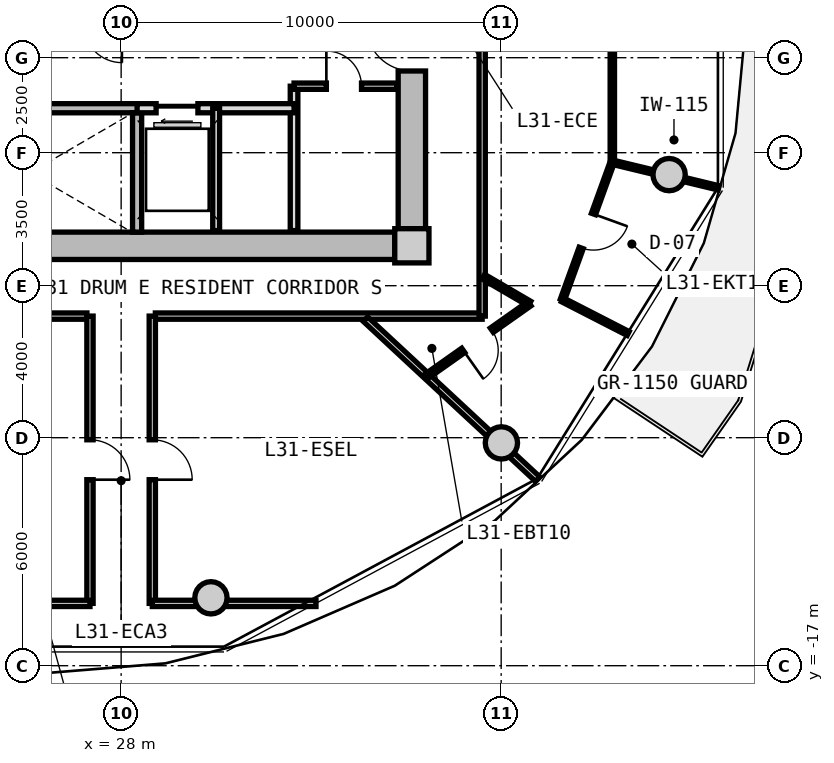
"""IFC4 building model, lengths in metres.
Left out: names, types, materials, properties, quantities, classifications, styles, units other than length and angle.
Written with IfcOpenShell. Run it as: python <this file> out.ifc"""

import sys

from ifc_helpers import new_model, si_unit, direction, frame, frame_2d, origin, origin_2d, place, context, subcontext, project, spatial, rectangle, circle, extrude, source, transform, mapped, element, fill, save


model = new_model("IFC4")
c1 = context("Model", 3, precision=1e-05, world=origin(), true_north=direction((0.0, 1.0)))
c2 = subcontext(c1, "Body", "Model", "MODEL_VIEW")
j1 = project(units=[si_unit("LENGTHUNIT", "METRE"), si_unit("PLANEANGLEUNIT", "RADIAN")], contexts=[c1])
p1 = place(None, origin())
s1 = spatial("IfcSite", under=j1, at=p1, CompositionType="ELEMENT")
p2 = place(p1, origin())
s2 = spatial("IfcBuilding", under=s1, at=p2, CompositionType="ELEMENT")
p3 = place(p2, frame((0.0, 0.0, 102.35)))
s3 = spatial("IfcBuildingStorey", under=s2, at=p3, CompositionType="ELEMENT", Elevation=102.35)
m1 = source(origin(), c2, "Body", "SweptSolid", [
    extrude(rectangle(XDim=0.9, YDim=0.9, at=origin_2d()), origin(), (0.0, 0.0, 1.0), 3.05),
])
p4 = place(p3, frame((35.65, -5.95, 0.0), z_axis=(0.0, 0.0, 1.0), x_axis=(1.0, 0.0, 0.0)))
e1 = element("IfcColumn", 1, at=p4, inside=s3, PredefinedType="COLUMN", context=c2, shape_type="MappedRepresentation", body=[
    mapped(m1, transform((0.0, 0.0, 0.0), x_axis=(1.0, 0.0, 0.0), y_axis=(0.0, 1.0, 0.0), z_axis=(0.0, 0.0, 1.0), scale=1.0)),
])
m2 = source(origin(), c2, "Body", "SweptSolid", [
    extrude(rectangle(XDim=14.4, YDim=0.72, at=frame_2d((7.2, 0.0))), origin(), (0.0, 0.0, 1.0), 2.79),
])
p5 = place(p3, frame((35.2, -5.95, 0.0), z_axis=(0.0, 0.0, 1.0), x_axis=(-1.0, 0.0, 0.0)))
e2 = element("IfcWall", 2, at=p5, inside=s3, PredefinedType="SHEAR", context=c2, shape_type="MappedRepresentation", body=[
    mapped(m2, transform((0.0, 0.0, 0.0), x_axis=(1.0, 0.0, 0.0), y_axis=(0.0, 1.0, 0.0), z_axis=(0.0, 0.0, 1.0), scale=1.0)),
])
m3 = source(origin(), c2, "Body", "SweptSolid", [
    extrude(rectangle(XDim=11.0, YDim=0.72, at=frame_2d((5.5, 0.0))), origin(), (0.0, 0.0, 1.0), 2.79),
])
p6 = place(p3, frame((35.65, 5.5, 0.0), z_axis=(0.0, 0.0, 1.0), x_axis=(0.0, -1.0, 0.0)))
e3 = element("IfcWall", 3, at=p6, inside=s3, PredefinedType="SHEAR", context=c2, shape_type="MappedRepresentation", body=[
    mapped(m3, transform((0.0, 0.0, 0.0), x_axis=(1.0, 0.0, 0.0), y_axis=(0.0, 1.0, 0.0), z_axis=(0.0, 0.0, 1.0), scale=1.0)),
])
p7 = place(p6, frame((5.65, 0.0, 0.0)))
e4 = element("IfcOpeningElement", 4, at=p7, cuts=e3, PredefinedType="OPENING", context=c2, shape_type="SweptSolid", body=[
    extrude(rectangle(XDim=1.2, YDim=2.15, at=frame_2d((0.6, 1.075))), frame((0.0, 0.37, 0.0), z_axis=(0.0, -1.0, 0.0), x_axis=(1.0, 0.0, 0.0)), (0.0, 0.0, 1.0), 0.74),
])
m4 = source(origin(), c2, "Body", "SweptSolid", [
    extrude(circle(Radius=0.425, at=origin_2d()), origin(), (0.0, 0.0, 1.0), 3.05),
])
for number, where, z_axis, x_axis in (
    (5, (30.363, -15.213, 0.0), (0.0, 0.0, 1.0), (1.0, 0.0, 0.0)),
    (6, (38.006, -11.137, 0.0), (0.0, 0.0, 1.0), (1.0, 0.0, 0.0)),
    (7, (42.419, -4.076, 0.0), (0.0, 0.0, 1.0), (1.0, 0.0, 0.0)),
):
    element("IfcColumn", number, at=place(p3, frame(where, z_axis=z_axis, x_axis=x_axis)), inside=s3, PredefinedType="COLUMN", context=c2, shape_type="MappedRepresentation", body=[
        mapped(m4, transform((0.0, 0.0, 0.0), x_axis=(1.0, 0.0, 0.0), y_axis=(0.0, 1.0, 0.0), z_axis=(0.0, 0.0, 1.0), scale=1.0)),
    ])
m5 = source(origin(), c2, "Body", "SweptSolid", [
    extrude(rectangle(XDim=7.83, YDim=0.24, at=frame_2d((3.915, 0.0))), origin(), (0.0, 0.0, 1.0), 2.79),
])
p8 = place(p3, frame((20.71, -2.33, 0.0), z_axis=(0.0, 0.0, 1.0), x_axis=(1.0, 0.0, 0.0)))
e8 = element("IfcWall", 8, at=p8, inside=s3, PredefinedType="PARTITIONING", context=c2, shape_type="MappedRepresentation", body=[
    mapped(m5, transform((0.0, 0.0, 0.0), x_axis=(1.0, 0.0, 0.0), y_axis=(0.0, 1.0, 0.0), z_axis=(0.0, 0.0, 1.0), scale=1.0)),
])
p9 = place(p8, frame((0.95, 0.0, 0.0)))
e9 = element("IfcOpeningElement", 9, at=p9, cuts=e8, PredefinedType="OPENING", context=c2, shape_type="SweptSolid", body=[
    extrude(rectangle(XDim=1.1, YDim=2.15, at=frame_2d((0.55, 1.075))), frame((0.0, 0.13, 0.0), z_axis=(0.0, -1.0, 0.0), x_axis=(1.0, 0.0, 0.0)), (0.0, 0.0, 1.0), 0.26),
])
m6 = source(origin(), c2, "Body", "SweptSolid", [
    extrude(rectangle(XDim=3.14, YDim=0.24, at=frame_2d((1.57, 0.0))), origin(), (0.0, 0.0, 1.0), 2.79),
])
p10 = place(p3, frame((28.42, -5.59, 0.0), z_axis=(0.0, 0.0, 1.0), x_axis=(0.0, 1.0, 0.0)))
e10 = element("IfcWall", 10, at=p10, inside=s3, PredefinedType="PARTITIONING", context=c2, shape_type="MappedRepresentation", body=[
    mapped(m6, transform((0.0, 0.0, 0.0), x_axis=(1.0, 0.0, 0.0), y_axis=(0.0, 1.0, 0.0), z_axis=(0.0, 0.0, 1.0), scale=1.0)),
])
m7 = source(origin(), c2, "Body", "SweptSolid", [
    extrude(rectangle(XDim=3.8, YDim=0.2, at=frame_2d((1.9, 0.0))), origin(), (0.0, 0.0, 1.0), 2.775),
])
p11 = place(p3, frame((32.55, -5.55, 0.0), z_axis=(0.0, 0.0, 1.0), x_axis=(0.0, 1.0, 0.0)))
e11 = element("IfcWall", 11, at=p11, inside=s3, PredefinedType="PARTITIONING", context=c2, shape_type="MappedRepresentation", body=[
    mapped(m7, transform((0.0, 0.0, 0.0), x_axis=(1.0, 0.0, 0.0), y_axis=(0.0, 1.0, 0.0), z_axis=(0.0, 0.0, 1.0), scale=1.0)),
])
m8 = source(origin(), c2, "Body", "SweptSolid", [
    extrude(rectangle(XDim=4.13, YDim=0.24, at=frame_2d((2.065, 0.0))), origin(), (0.0, 0.0, 1.0), 2.775),
])
p12 = place(p3, frame((28.42, -2.33, 0.0), z_axis=(0.0, 0.0, 1.0), x_axis=(1.0, 0.0, 0.0)))
e12 = element("IfcWall", 12, at=p12, inside=s3, PredefinedType="PARTITIONING", context=c2, shape_type="MappedRepresentation", body=[
    mapped(m8, transform((0.0, 0.0, 0.0), x_axis=(1.0, 0.0, 0.0), y_axis=(0.0, 1.0, 0.0), z_axis=(0.0, 0.0, 1.0), scale=1.0)),
])
p13 = place(p12, frame((0.5, 0.0, 0.0)))
e13 = element("IfcOpeningElement", 13, at=p13, cuts=e12, PredefinedType="OPENING", context=c2, shape_type="SweptSolid", body=[
    extrude(rectangle(XDim=1.1, YDim=2.2, at=frame_2d((0.55, 1.1))), frame((0.0, 0.13, 0.0), z_axis=(0.0, -1.0, 0.0), x_axis=(1.0, 0.0, 0.0)), (0.0, 0.0, 1.0), 0.26),
])
m9 = source(origin(), c2, "Body", "SweptSolid", [
    extrude(rectangle(XDim=3.22, YDim=0.18, at=frame_2d((1.61, 0.0))), origin(), (0.0, 0.0, 1.0), 2.775),
])
p14 = place(p3, frame((30.5, -5.55, 0.0), z_axis=(0.0, 0.0, 1.0), x_axis=(0.0, 1.0, 0.0)))
e14 = element("IfcWall", 14, at=p14, inside=s3, PredefinedType="PARTITIONING", context=c2, shape_type="MappedRepresentation", body=[
    mapped(m9, transform((0.0, 0.0, 0.0), x_axis=(1.0, 0.0, 0.0), y_axis=(0.0, 1.0, 0.0), z_axis=(0.0, 0.0, 1.0), scale=1.0)),
])
m10 = source(origin(), c2, "Body", "SweptSolid", [
    extrude(rectangle(XDim=2.7, YDim=0.165, at=frame_2d((1.35, 0.0))), origin(), (0.0, 0.0, 1.0), 2.775),
])
p15 = place(p3, frame((32.55, -1.75, 0.0), z_axis=(0.0, 0.0, 1.0), x_axis=(1.0, 0.0, 0.0)))
e15 = element("IfcWall", 15, at=p15, inside=s3, PredefinedType="PARTITIONING", context=c2, shape_type="MappedRepresentation", body=[
    mapped(m10, transform((0.0, 0.0, 0.0), x_axis=(1.0, 0.0, 0.0), y_axis=(0.0, 1.0, 0.0), z_axis=(0.0, 0.0, 1.0), scale=1.0)),
])
p16 = place(p15, frame((0.85, 0.0, 0.0)))
e16 = element("IfcOpeningElement", 16, at=p16, cuts=e15, PredefinedType="OPENING", context=c2, shape_type="SweptSolid", body=[
    extrude(rectangle(XDim=0.925, YDim=2.1, at=frame_2d((0.462, 1.05))), frame((0.0, 0.093, 0.0), z_axis=(0.0, -1.0, 0.0), x_axis=(1.0, 0.0, 0.0)), (0.0, 0.0, 1.0), 0.185),
])
m11 = source(origin(), c2, "Body", "SweptSolid", [
    extrude(rectangle(XDim=8.6, YDim=0.165, at=frame_2d((4.3, 0.0))), origin(), (0.0, 0.0, 1.0), 2.775),
])
p17 = place(p3, frame((37.5, -7.8, 0.0), z_axis=(0.0, 0.0, 1.0), x_axis=(-1.0, 0.0, 0.0)))
e17 = element("IfcWall", 17, at=p17, inside=s3, PredefinedType="PARTITIONING", context=c2, shape_type="MappedRepresentation", body=[
    mapped(m11, transform((0.0, 0.0, 0.0), x_axis=(1.0, 0.0, 0.0), y_axis=(0.0, 1.0, 0.0), z_axis=(0.0, 0.0, 1.0), scale=1.0)),
])
p18 = place(p3, frame((27.1, -7.8, 0.0), z_axis=(0.0, 0.0, 1.0), x_axis=(-1.0, 0.0, 0.0)))
e18 = element("IfcWall", 18, at=p18, inside=s3, PredefinedType="PARTITIONING", context=c2, shape_type="MappedRepresentation", body=[
    mapped(m11, transform((0.0, 0.0, 0.0), x_axis=(1.0, 0.0, 0.0), y_axis=(0.0, 1.0, 0.0), z_axis=(0.0, 0.0, 1.0), scale=1.0)),
])
p19 = place(p18, frame((4.384, 0.0, 0.0)))
e19 = element("IfcOpeningElement", 19, at=p19, cuts=e18, PredefinedType="OPENING", context=c2, shape_type="SweptSolid", body=[
    extrude(rectangle(XDim=1.05, YDim=2.15, at=frame_2d((0.525, 1.075))), frame((0.0, 0.093, 0.0), z_axis=(0.0, -1.0, 0.0), x_axis=(1.0, 0.0, 0.0)), (0.0, 0.0, 1.0), 0.185),
])
m12 = source(origin(), c2, "Body", "SweptSolid", [
    extrude(rectangle(XDim=15.6, YDim=0.165, at=frame_2d((7.8, 0.0))), origin(), (0.0, 0.0, 1.0), 2.775),
])
p20 = place(p3, frame((37.5, 7.8, 0.0), z_axis=(0.0, 0.0, 1.0), x_axis=(0.0, -1.0, 0.0)))
e20 = element("IfcWall", 20, at=p20, inside=s3, PredefinedType="PARTITIONING", context=c2, shape_type="MappedRepresentation", body=[
    mapped(m12, transform((0.0, 0.0, 0.0), x_axis=(1.0, 0.0, 0.0), y_axis=(0.0, 1.0, 0.0), z_axis=(0.0, 0.0, 1.0), scale=1.0)),
])
p21 = place(p20, frame((6.87, 0.0, 0.0)))
e21 = element("IfcOpeningElement", 21, at=p21, cuts=e20, PredefinedType="OPENING", context=c2, shape_type="SweptSolid", body=[
    extrude(rectangle(XDim=1.05, YDim=2.15, at=frame_2d((0.525, 1.075))), frame((0.0, 0.093, 0.0), z_axis=(0.0, -1.0, 0.0), x_axis=(1.0, 0.0, 0.0)), (0.0, 0.0, 1.0), 0.185),
])
m13 = source(origin(), c2, "Body", "SweptSolid", [
    extrude(rectangle(XDim=6.187, YDim=0.165, at=frame_2d((3.093, 0.0))), origin(), (0.0, 0.0, 1.0), 2.275),
])
p22 = place(p3, frame((34.429, -7.88, 0.0), z_axis=(0.0, 0.0, 1.0), x_axis=(0.732501077882, -0.680765870841, 0.0)))
e22 = element("IfcWall", 22, at=p22, inside=s3, PredefinedType="PARTITIONING", context=c2, shape_type="MappedRepresentation", body=[
    mapped(m13, transform((0.0, 0.0, 0.0), x_axis=(1.0, 0.0, 0.0), y_axis=(0.0, 1.0, 0.0), z_axis=(0.0, 0.0, 1.0), scale=1.0)),
])
m14 = source(origin(), c2, "Body", "SweptSolid", [
    extrude(rectangle(XDim=7.56, YDim=0.165, at=frame_2d((3.78, 0.0))), origin(), (0.0, 0.0, 1.0), 2.775),
])
p23 = place(p3, frame((27.18, -15.36, 0.0), z_axis=(0.0, 0.0, 1.0), x_axis=(0.0, 1.0, 0.0)))
e23 = element("IfcWall", 23, at=p23, inside=s3, PredefinedType="PARTITIONING", context=c2, shape_type="MappedRepresentation", body=[
    mapped(m14, transform((0.0, 0.0, 0.0), x_axis=(1.0, 0.0, 0.0), y_axis=(0.0, 1.0, 0.0), z_axis=(0.0, 0.0, 1.0), scale=1.0)),
])
p24 = place(p23, frame((3.255, 0.0, 0.0)))
e24 = element("IfcOpeningElement", 24, at=p24, cuts=e23, PredefinedType="OPENING", context=c2, shape_type="SweptSolid", body=[
    extrude(rectangle(XDim=1.05, YDim=2.15, at=frame_2d((0.525, 1.075))), frame((0.0, 0.093, 0.0), z_axis=(0.0, -1.0, 0.0), x_axis=(1.0, 0.0, 0.0)), (0.0, 0.0, 1.0), 0.185),
])
m15 = source(origin(), c2, "Body", "SweptSolid", [
    extrude(rectangle(XDim=5.814, YDim=0.165, at=frame_2d((2.907, 0.0))), origin(), (0.0, 0.0, 1.0), 2.275),
])
p25 = place(p3, frame((21.366, -15.36, 0.0), z_axis=(0.0, 0.0, 1.0), x_axis=(1.0, 0.0, 0.0)))
e25 = element("IfcWall", 25, at=p25, inside=s3, PredefinedType="PARTITIONING", context=c2, shape_type="MappedRepresentation", body=[
    mapped(m15, transform((0.0, 0.0, 0.0), x_axis=(1.0, 0.0, 0.0), y_axis=(0.0, 1.0, 0.0), z_axis=(0.0, 0.0, 1.0), scale=1.0)),
])
p26 = place(p3, frame((28.82, -15.36, 0.0), z_axis=(0.0, 0.0, 1.0), x_axis=(0.0, 1.0, 0.0)))
e26 = element("IfcWall", 26, at=p26, inside=s3, PredefinedType="PARTITIONING", context=c2, shape_type="MappedRepresentation", body=[
    mapped(m14, transform((0.0, 0.0, 0.0), x_axis=(1.0, 0.0, 0.0), y_axis=(0.0, 1.0, 0.0), z_axis=(0.0, 0.0, 1.0), scale=1.0)),
])
p27 = place(p26, frame((3.255, 0.0, 0.0)))
e27 = element("IfcOpeningElement", 27, at=p27, cuts=e26, PredefinedType="OPENING", context=c2, shape_type="SweptSolid", body=[
    extrude(rectangle(XDim=1.05, YDim=2.15, at=frame_2d((0.525, 1.075))), frame((0.0, 0.093, 0.0), z_axis=(0.0, -1.0, 0.0), x_axis=(1.0, 0.0, 0.0)), (0.0, 0.0, 1.0), 0.185),
])
m16 = source(origin(), c2, "Body", "SweptSolid", [
    extrude(rectangle(XDim=4.307, YDim=0.165, at=frame_2d((2.153, 0.0))), origin(), (0.0, 0.0, 1.0), 2.275),
])
p28 = place(p3, frame((28.82, -15.36, 0.0), z_axis=(0.0, 0.0, 1.0), x_axis=(1.0, 0.0, 0.0)))
e28 = element("IfcWall", 28, at=p28, inside=s3, PredefinedType="PARTITIONING", context=c2, shape_type="MappedRepresentation", body=[
    mapped(m16, transform((0.0, 0.0, 0.0), x_axis=(1.0, 0.0, 0.0), y_axis=(0.0, 1.0, 0.0), z_axis=(0.0, 0.0, 1.0), scale=1.0)),
])
m17 = source(origin(), c2, "Body", "SweptSolid", [
    extrude(rectangle(XDim=7.499, YDim=0.115, at=frame_2d((3.75, 0.0))), origin(), (0.0, 0.0, 1.0), 2.775),
])
p29 = place(p3, frame((40.925, -3.75, 0.0), z_axis=(0.0, 0.0, 1.0), x_axis=(0.0, 1.0, 0.0)))
e29 = element("IfcWall", 29, at=p29, inside=s3, PredefinedType="PARTITIONING", context=c2, shape_type="MappedRepresentation", body=[
    mapped(m17, transform((0.0, 0.0, 0.0), x_axis=(1.0, 0.0, 0.0), y_axis=(0.0, 1.0, 0.0), z_axis=(0.0, 0.0, 1.0), scale=1.0)),
])
p30 = place(p29, frame((3.275, 0.0, 0.0)))
e30 = element("IfcOpeningElement", 30, at=p30, cuts=e29, PredefinedType="OPENING", context=c2, shape_type="SweptSolid", body=[
    extrude(rectangle(XDim=0.95, YDim=2.1, at=frame_2d((0.475, 1.05))), frame((0.0, 0.067, 0.0), z_axis=(0.0, -1.0, 0.0), x_axis=(1.0, 0.0, 0.0)), (0.0, 0.0, 1.0), 0.135),
])
m18 = source(origin(), c2, "Body", "SweptSolid", [
    extrude(rectangle(XDim=2.879, YDim=0.115, at=frame_2d((1.439, 0.0))), origin(), (0.0, 0.0, 1.0), 2.275),
])
p31 = place(p3, frame((40.925, -3.75, 0.0), z_axis=(0.0, 0.0, 1.0), x_axis=(0.972018140943, -0.234905797454, 0.0)))
e31 = element("IfcWall", 31, at=p31, inside=s3, PredefinedType="PARTITIONING", context=c2, shape_type="MappedRepresentation", body=[
    mapped(m18, transform((0.0, 0.0, 0.0), x_axis=(1.0, 0.0, 0.0), y_axis=(0.0, 1.0, 0.0), z_axis=(0.0, 0.0, 1.0), scale=1.0)),
])
m19 = source(origin(), c2, "Body", "SweptSolid", [
    extrude(rectangle(XDim=1.407, YDim=0.14, at=frame_2d((0.704, 0.0))), origin(), (0.0, 0.0, 1.0), 2.775),
])
p32 = place(p3, frame((37.53, -6.762, 0.0), z_axis=(0.0, 0.0, 1.0), x_axis=(0.863539718977, -0.504280828258, 0.0)))
e32 = element("IfcWall", 32, at=p32, inside=s3, PredefinedType="PARTITIONING", context=c2, shape_type="MappedRepresentation", body=[
    mapped(m19, transform((0.0, 0.0, 0.0), x_axis=(1.0, 0.0, 0.0), y_axis=(0.0, 1.0, 0.0), z_axis=(0.0, 0.0, 1.0), scale=1.0)),
])
m20 = source(origin(), c2, "Body", "SweptSolid", [
    extrude(rectangle(XDim=3.347, YDim=0.14, at=frame_2d((1.673, 0.0))), origin(), (0.0, 0.0, 1.0), 2.775),
])
p33 = place(p3, frame((38.745, -7.472, 0.0), z_axis=(0.0, 0.0, 1.0), x_axis=(-0.81705680263, -0.576557179537, 0.0)))
e33 = element("IfcWall", 33, at=p33, inside=s3, PredefinedType="PARTITIONING", context=c2, shape_type="MappedRepresentation", body=[
    mapped(m20, transform((0.0, 0.0, 0.0), x_axis=(1.0, 0.0, 0.0), y_axis=(0.0, 1.0, 0.0), z_axis=(0.0, 0.0, 1.0), scale=1.0)),
])
p34 = place(p33, frame((1.214, 0.0, 0.0)))
e34 = element("IfcOpeningElement", 34, at=p34, cuts=e33, PredefinedType="OPENING", context=c2, shape_type="SweptSolid", body=[
    extrude(rectangle(XDim=0.92, YDim=2.1, at=frame_2d((0.46, 1.05))), frame((0.0, 0.08, 0.0), z_axis=(0.0, -1.0, 0.0), x_axis=(1.0, 0.0, 0.0)), (0.0, 0.0, 1.0), 0.16),
])
m21 = source(origin(), c2, "Body", "SweptSolid", [
    extrude(rectangle(XDim=1.945, YDim=0.115, at=frame_2d((0.973, 0.0))), origin(), (0.0, 0.0, 1.0), 2.775),
])
p35 = place(p3, frame((39.611, -7.37, 0.0), z_axis=(0.0, 0.0, 1.0), x_axis=(0.889684148329, -0.456576517368, 0.0)))
e35 = element("IfcWall", 35, at=p35, inside=s3, PredefinedType="PARTITIONING", context=c2, shape_type="MappedRepresentation", body=[
    mapped(m21, transform((0.0, 0.0, 0.0), x_axis=(1.0, 0.0, 0.0), y_axis=(0.0, 1.0, 0.0), z_axis=(0.0, 0.0, 1.0), scale=1.0)),
])
m22 = source(origin(), c2, "Body", "SweptSolid", [
    extrude(rectangle(XDim=3.852, YDim=0.115, at=frame_2d((1.926, 0.0))), origin(), (0.0, 0.0, 1.0), 2.775),
])
p36 = place(p3, frame((39.611, -7.37, 0.0), z_axis=(0.0, 0.0, 1.0), x_axis=(0.340653649518, 0.940188859257, 0.0)))
e36 = element("IfcWall", 36, at=p36, inside=s3, PredefinedType="PARTITIONING", context=c2, shape_type="MappedRepresentation", body=[
    mapped(m22, transform((0.0, 0.0, 0.0), x_axis=(1.0, 0.0, 0.0), y_axis=(0.0, 1.0, 0.0), z_axis=(0.0, 0.0, 1.0), scale=1.0)),
])
p37 = place(p36, frame((1.451, 0.0, 0.0)))
e37 = element("IfcOpeningElement", 37, at=p37, cuts=e36, PredefinedType="OPENING", context=c2, shape_type="SweptSolid", body=[
    extrude(rectangle(XDim=0.95, YDim=2.1, at=frame_2d((0.475, 1.05))), frame((0.0, 0.067, 0.0), z_axis=(0.0, -1.0, 0.0), x_axis=(1.0, 0.0, 0.0)), (0.0, 0.0, 1.0), 0.135),
])
m23 = source(origin(), c2, "Body", "SweptSolid", [
    extrude(rectangle(XDim=1.2, YDim=2.15, at=frame_2d((0.6, 1.075))), frame((0.0, 0.025, 0.0), z_axis=(0.0, -1.0, 0.0), x_axis=(1.0, 0.0, 0.0)), (0.0, 0.0, 1.0), 0.05),
])
p38 = place(p7, frame((1.2, 0.0, 0.0), z_axis=(0.0, 0.0, 1.0), x_axis=(-1.0, 0.0, 0.0)))
e38 = element("IfcDoor", 38, at=p38, inside=s3, OperationType="SINGLE_SWING_RIGHT", PredefinedType="DOOR", context=c2, shape_type="MappedRepresentation", body=[
    mapped(m23, transform((0.0, 0.0, 0.0), x_axis=(1.0, 0.0, 0.0), y_axis=(0.0, 1.0, 0.0), z_axis=(0.0, 0.0, 1.0), scale=1.0)),
])
fill(e4, e38)
m24 = source(origin(), c2, "Body", "SweptSolid", [
    extrude(rectangle(XDim=1.1, YDim=2.2, at=frame_2d((0.55, 1.1))), frame((0.0, 0.025, 0.0), z_axis=(0.0, -1.0, 0.0), x_axis=(1.0, 0.0, 0.0)), (0.0, 0.0, 1.0), 0.05),
])
p39 = place(p13, frame((1.1, 0.0, 0.0), z_axis=(0.0, 0.0, 1.0), x_axis=(-1.0, 0.0, 0.0)))
e39 = element("IfcDoor", 39, at=p39, inside=s3, OperationType="SLIDING_TO_LEFT", PredefinedType="DOOR", context=c2, shape_type="MappedRepresentation", body=[
    mapped(m24, transform((0.0, 0.0, 0.0), x_axis=(1.0, 0.0, 0.0), y_axis=(0.0, 1.0, 0.0), z_axis=(0.0, 0.0, 1.0), scale=1.0)),
])
fill(e13, e39)
m25 = source(origin(), c2, "Body", "SweptSolid", [
    extrude(rectangle(XDim=0.925, YDim=2.1, at=frame_2d((0.462, 1.05))), frame((0.0, 0.025, 0.0), z_axis=(0.0, -1.0, 0.0), x_axis=(1.0, 0.0, 0.0)), (0.0, 0.0, 1.0), 0.05),
])
p40 = place(p16, origin())
e40 = element("IfcDoor", 40, at=p40, inside=s3, OperationType="SINGLE_SWING_LEFT", PredefinedType="DOOR", context=c2, shape_type="MappedRepresentation", body=[
    mapped(m25, transform((0.0, 0.0, 0.0), x_axis=(1.0, 0.0, 0.0), y_axis=(0.0, 1.0, 0.0), z_axis=(0.0, 0.0, 1.0), scale=1.0)),
])
fill(e16, e40)
m26 = source(origin(), c2, "Body", "SweptSolid", [
    extrude(rectangle(XDim=1.05, YDim=2.15, at=frame_2d((0.525, 1.075))), frame((0.0, 0.025, 0.0), z_axis=(0.0, -1.0, 0.0), x_axis=(1.0, 0.0, 0.0)), (0.0, 0.0, 1.0), 0.05),
])
p41 = place(p24, frame((1.05, 0.0, 0.0), z_axis=(0.0, 0.0, 1.0), x_axis=(-1.0, 0.0, 0.0)))
e41 = element("IfcDoor", 41, at=p41, inside=s3, OperationType="SINGLE_SWING_RIGHT", PredefinedType="DOOR", context=c2, shape_type="MappedRepresentation", body=[
    mapped(m26, transform((0.0, 0.0, 0.0), x_axis=(1.0, 0.0, 0.0), y_axis=(0.0, 1.0, 0.0), z_axis=(0.0, 0.0, 1.0), scale=1.0)),
])
fill(e24, e41)
p42 = place(p27, frame((1.05, 0.0, 0.0), z_axis=(0.0, 0.0, 1.0), x_axis=(-1.0, 0.0, 0.0)))
e42 = element("IfcDoor", 42, at=p42, inside=s3, OperationType="SINGLE_SWING_RIGHT", PredefinedType="DOOR", context=c2, shape_type="MappedRepresentation", body=[
    mapped(m26, transform((0.0, 0.0, 0.0), x_axis=(1.0, 0.0, 0.0), y_axis=(0.0, 1.0, 0.0), z_axis=(0.0, 0.0, 1.0), scale=1.0)),
])
fill(e27, e42)
m27 = source(origin(), c2, "Body", "SweptSolid", [
    extrude(rectangle(XDim=0.92, YDim=2.1, at=frame_2d((0.46, 1.05))), frame((0.0, 0.025, 0.0), z_axis=(0.0, -1.0, 0.0), x_axis=(1.0, 0.0, 0.0)), (0.0, 0.0, 1.0), 0.05),
])
p43 = place(p34, origin())
e43 = element("IfcDoor", 43, at=p43, inside=s3, OperationType="SINGLE_SWING_RIGHT", PredefinedType="DOOR", context=c2, shape_type="MappedRepresentation", body=[
    mapped(m27, transform((0.0, 0.0, 0.0), x_axis=(1.0, 0.0, 0.0), y_axis=(0.0, 1.0, 0.0), z_axis=(0.0, 0.0, 1.0), scale=1.0)),
])
fill(e34, e43)
m28 = source(origin(), c2, "Body", "SweptSolid", [
    extrude(rectangle(XDim=0.95, YDim=2.1, at=frame_2d((0.475, 1.05))), frame((0.0, 0.025, 0.0), z_axis=(0.0, -1.0, 0.0), x_axis=(1.0, 0.0, 0.0)), (0.0, 0.0, 1.0), 0.05),
])
p44 = place(p37, frame((0.95, 0.0, 0.0), z_axis=(0.0, 0.0, 1.0), x_axis=(-1.0, 0.0, 0.0)))
e44 = element("IfcDoor", 44, at=p44, inside=s3, OperationType="SINGLE_SWING_LEFT", PredefinedType="DOOR", context=c2, shape_type="MappedRepresentation", body=[
    mapped(m28, transform((0.0, 0.0, 0.0), x_axis=(1.0, 0.0, 0.0), y_axis=(0.0, 1.0, 0.0), z_axis=(0.0, 0.0, 1.0), scale=1.0)),
])
fill(e37, e44)
save(model, sys.argv[1])
